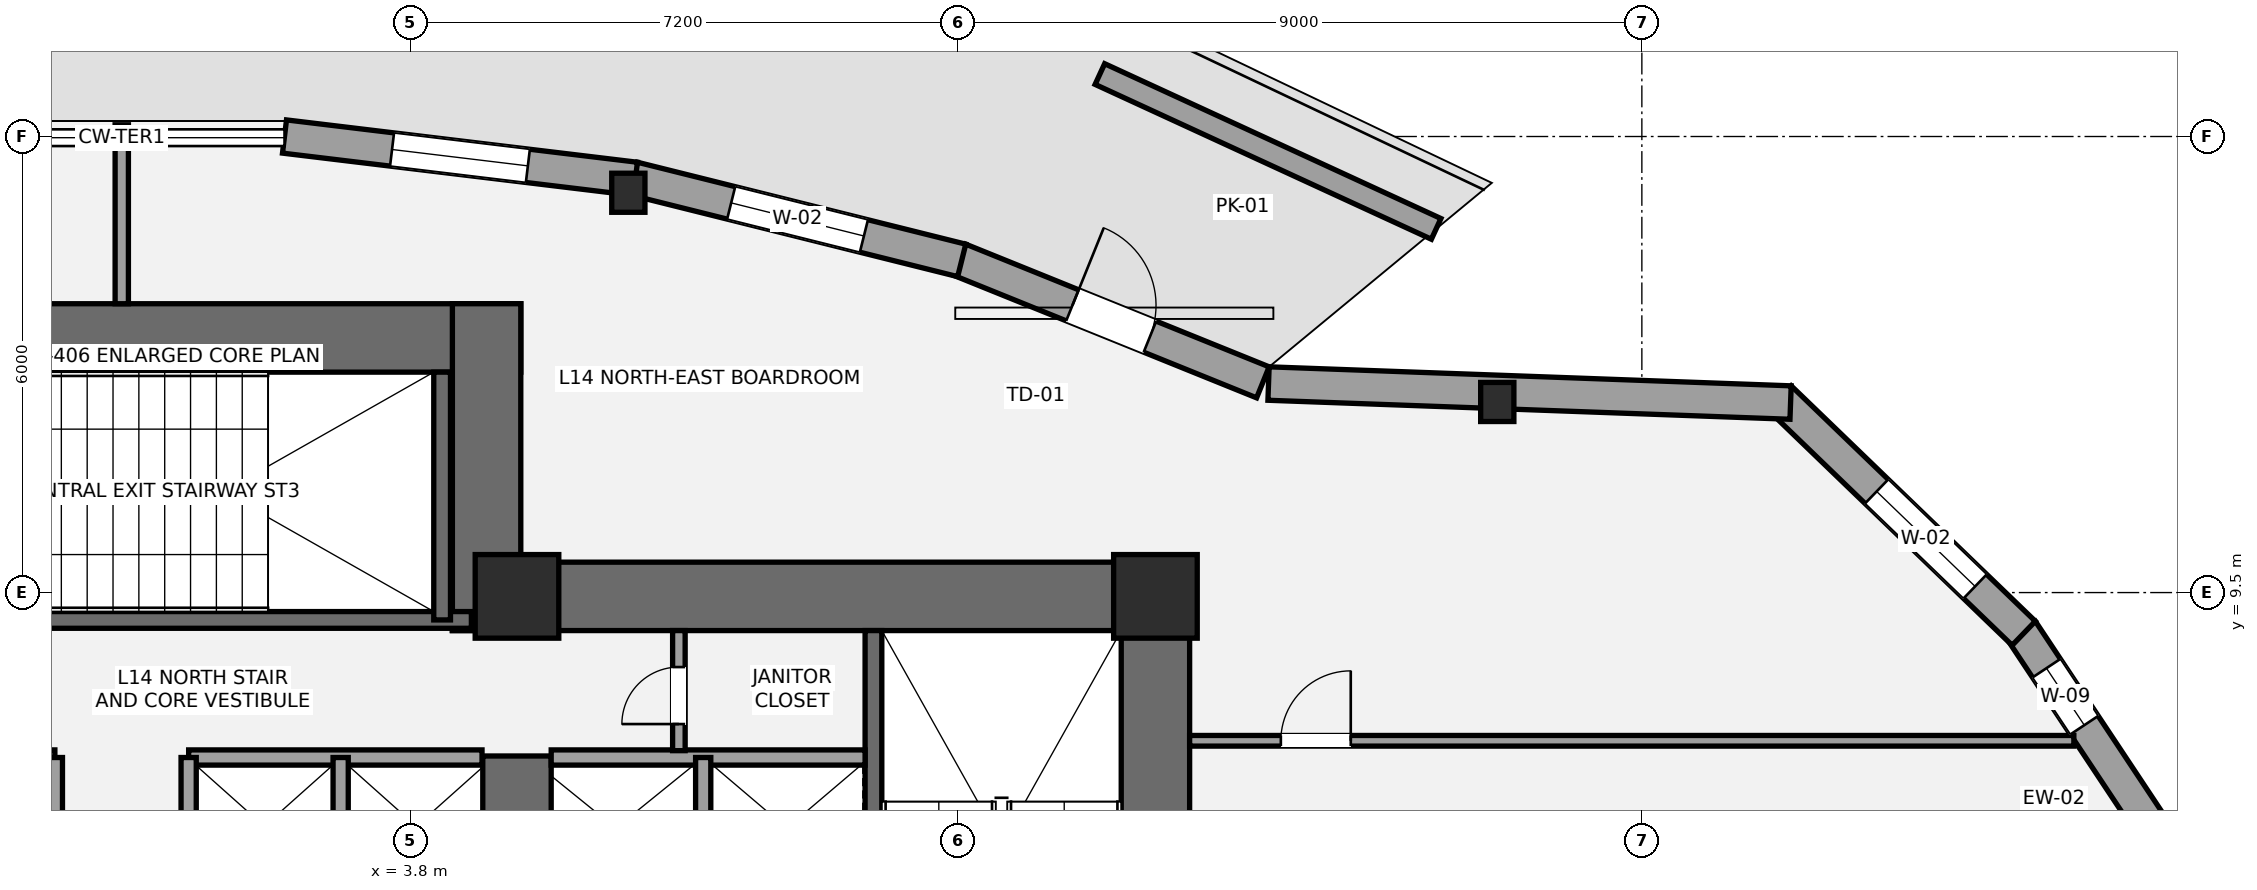
"""IFC4 building model, lengths in metres.
Left out: names, types, materials, properties, quantities, classifications, styles, units other than length and angle.
Written with IfcOpenShell. Run it as: python <this file> out.ifc"""

import sys

from ifc_helpers import new_model, si_unit, direction, frame, frame_2d, origin, origin_2d, place, context, subcontext, project, spatial, rectangle, i_section, extrude, element, fill, save


model = new_model("IFC4")
c1 = context("Model", 3, precision=1e-05, world=origin(), true_north=direction((0.0, 1.0)))
c2 = subcontext(c1, "Body", "Model", "MODEL_VIEW")
j1 = project(units=[si_unit("LENGTHUNIT", "METRE"), si_unit("PLANEANGLEUNIT", "RADIAN")], contexts=[c1])
p1 = place(None, origin())
s1 = spatial("IfcSite", under=j1, at=p1, CompositionType="ELEMENT")
p2 = place(p1, origin())
s2 = spatial("IfcBuilding", under=s1, at=p2, CompositionType="ELEMENT")
p3 = place(p2, frame((0.0, 0.0, 55.8)))
s3 = spatial("IfcBuildingStorey", under=s2, at=p3, CompositionType="ELEMENT", Elevation=55.8)
p4 = place(p3, frame((13.6, 0.95, 0.0), z_axis=(0.0, 0.0, 1.0), x_axis=(0.0, 1.0, 0.0)))
e1 = element("IfcWall", 1, at=p4, inside=s3, PredefinedType="SHEAR", context=c2, shape_type="SweptSolid", body=[
    extrude(rectangle(XDim=8.95, YDim=0.9, at=frame_2d((4.475, 0.0))), origin(), (0.0, 0.0, 1.0), 3.6),
])
p5 = place(p3, frame((4.35, 9.45, 0.0), z_axis=(0.0, 0.0, 1.0), x_axis=(1.0, 0.0, 0.0)))
e2 = element("IfcWall", 2, at=p5, inside=s3, PredefinedType="SHEAR", context=c2, shape_type="SweptSolid", body=[
    extrude(rectangle(XDim=9.7, YDim=0.9, at=frame_2d((4.85, 0.0))), origin(), (0.0, 0.0, 1.0), 3.6),
])
p6 = place(p3, frame((5.2, 5.35, 0.0), z_axis=(0.0, 0.0, 1.0), x_axis=(0.0, 1.0, 0.0)))
e3 = element("IfcWall", 3, at=p6, inside=s3, PredefinedType="SHEAR", context=c2, shape_type="SweptSolid", body=[
    extrude(rectangle(XDim=2.0, YDim=0.9, at=frame_2d((1.0, 0.0))), origin(), (0.0, 0.0, 1.0), 3.6),
])
p7 = place(p3, frame((9.89, 1.85, 0.0), z_axis=(0.0, 0.0, 1.0), x_axis=(0.0, 1.0, 0.0)))
e4 = element("IfcWall", 4, at=p7, inside=s3, PredefinedType="SHEAR", context=c2, shape_type="SweptSolid", body=[
    extrude(rectangle(XDim=7.15, YDim=0.22, at=frame_2d((3.575, 0.0))), origin(), (0.0, 0.0, 1.0), 3.6),
])
p8 = place(p3, frame((-5.25, 12.85, 0.0), z_axis=(0.0, 0.0, 1.0), x_axis=(1.0, 0.0, 0.0)))
e5 = element("IfcWall", 5, at=p8, inside=s3, PredefinedType="SHEAR", context=c2, shape_type="SweptSolid", body=[
    extrude(rectangle(XDim=10.5, YDim=0.9, at=frame_2d((5.25, 0.0))), origin(), (0.0, 0.0, 1.0), 3.6),
])
p9 = place(p3, frame((4.8, 9.0, 0.0), z_axis=(0.0, 0.0, 1.0), x_axis=(0.0, 1.0, 0.0)))
e6 = element("IfcWall", 6, at=p9, inside=s3, PredefinedType="SHEAR", context=c2, shape_type="SweptSolid", body=[
    extrude(rectangle(XDim=4.3, YDim=0.9, at=frame_2d((2.15, 0.0))), origin(), (0.0, 0.0, 1.0), 3.6),
])
p10 = place(p3, frame((-4.7, 9.14, 0.0), z_axis=(0.0, 0.0, 1.0), x_axis=(1.0, 0.0, 0.0)))
e7 = element("IfcWall", 7, at=p10, inside=s3, PredefinedType="SHEAR", context=c2, shape_type="SweptSolid", body=[
    extrude(rectangle(XDim=9.3, YDim=0.22, at=frame_2d((4.65, 0.0))), origin(), (0.0, 0.0, 1.0), 3.6),
])
p11 = place(p10, frame((1.15, 0.0, 0.0)))
e8 = element("IfcOpeningElement", 8, at=p11, cuts=e7, PredefinedType="OPENING", context=c2, shape_type="SweptSolid", body=[
    extrude(rectangle(XDim=1.05, YDim=2.15, at=frame_2d((0.525, 1.075))), frame((0.0, 0.12, 0.0), z_axis=(0.0, -1.0, 0.0), x_axis=(1.0, 0.0, 0.0)), (0.0, 0.0, 1.0), 0.24),
])
p12 = place(p3, frame((4.215, 9.14, 0.0), z_axis=(0.0, 0.0, 1.0), x_axis=(0.0, 1.0, 0.0)))
e9 = element("IfcWall", 9, at=p12, inside=s3, PredefinedType="SHEAR", context=c2, shape_type="SweptSolid", body=[
    extrude(rectangle(XDim=3.26, YDim=0.22, at=frame_2d((1.63, 0.0))), origin(), (0.0, 0.0, 1.0), 3.6),
])
for number, where, z_axis, x_axis in (
    (10, (5.2, 9.45, 0.0), (0.0, 0.0, 1.0), (1.0, 0.0, 0.0)),
    (11, (13.6, 9.45, 0.0), (0.0, 0.0, 1.0), (1.0, 0.0, 0.0)),
):
    element("IfcColumn", number, at=place(p3, frame(where, z_axis=z_axis, x_axis=x_axis)), inside=s3, PredefinedType="COLUMN", context=c2, shape_type="SweptSolid", body=[
        extrude(rectangle(XDim=1.1, YDim=1.1, at=origin_2d()), origin(), (0.0, 0.0, 1.0), 3.6),
    ])
for number, where, z_axis, x_axis in (
    (12, (18.098, 12.007, 0.0), (0.0, 0.0, 1.0), (1.0, 0.0, 0.0)),
    (13, (6.665, 14.76, 0.0), (0.0, 0.0, 1.0), (1.0, 0.0, 0.0)),
):
    element("IfcColumn", number, at=place(p3, frame(where, z_axis=z_axis, x_axis=x_axis)), inside=s3, PredefinedType="COLUMN", context=c2, shape_type="SweptSolid", body=[
        extrude(i_section(OverallWidth=0.437, OverallDepth=0.514, WebThickness=0.061, FlangeThickness=0.097, at=origin_2d()), origin(), (0.0, 0.0, 1.0), 3.6),
    ])
p13 = place(p3, frame((24.994, 9.001, 0.0), z_axis=(0.0, 0.0, 1.0), x_axis=(0.553144350008, -0.833085426625, 0.0)))
e14 = element("IfcWall", 14, at=p13, inside=s3, PredefinedType="STANDARD", context=c2, shape_type="SweptSolid", body=[
    extrude(rectangle(XDim=4.167, YDim=0.44, at=frame_2d((2.083, 0.0))), origin(), (0.0, 0.0, 1.0), 2.529),
])
p14 = place(p13, frame((0.595, 0.0, 0.58)))
e15 = element("IfcOpeningElement", 15, at=p14, cuts=e14, PredefinedType="OPENING", context=c2, shape_type="SweptSolid", body=[
    extrude(rectangle(XDim=0.9, YDim=1.35, at=frame_2d((0.45, 0.675))), frame((0.0, 0.23, 0.0), z_axis=(0.0, -1.0, 0.0), x_axis=(1.0, 0.0, 0.0)), (0.0, 0.0, 1.0), 0.46),
])
p15 = place(p3, frame((21.812, 12.061, 0.0), z_axis=(0.0, 0.0, 1.0), x_axis=(0.719928259859, -0.694048485811, 0.0)))
e16 = element("IfcWall", 16, at=p15, inside=s3, PredefinedType="STANDARD", context=c2, shape_type="SweptSolid", body=[
    extrude(rectangle(XDim=4.462, YDim=0.44, at=frame_2d((2.231, 0.0))), origin(), (0.0, 0.0, 1.0), 2.529),
])
p16 = place(p15, frame((1.774, 0.0, 0.65)))
e17 = element("IfcOpeningElement", 17, at=p16, cuts=e16, PredefinedType="OPENING", context=c2, shape_type="SweptSolid", body=[
    extrude(rectangle(XDim=1.8, YDim=1.7, at=frame_2d((0.9, 0.85))), frame((0.0, 0.23, 0.0), z_axis=(0.0, -1.0, 0.0), x_axis=(1.0, 0.0, 0.0)), (0.0, 0.0, 1.0), 0.46),
])
p17 = place(p3, frame((15.088, 12.25, 0.0), z_axis=(0.0, 0.0, 1.0), x_axis=(0.99933827779, -0.036373156908, 0.0)))
e18 = element("IfcWall", 18, at=p17, inside=s3, PredefinedType="STANDARD", context=c2, shape_type="SweptSolid", body=[
    extrude(rectangle(XDim=6.873, YDim=0.44, at=frame_2d((3.437, 0.0))), origin(), (0.0, 0.0, 1.0), 2.533),
])
p18 = place(p3, frame((11.022, 13.88, 0.0), z_axis=(0.0, 0.0, 1.0), x_axis=(0.927093714831, -0.374829619856, 0.0)))
e19 = element("IfcWall", 19, at=p18, inside=s3, PredefinedType="STANDARD", context=c2, shape_type="SweptSolid", body=[
    extrude(rectangle(XDim=4.305, YDim=0.44, at=frame_2d((2.153, 0.0))), origin(), (0.0, 0.0, 1.0), 2.533),
])
p19 = place(p18, frame((1.603, 0.0, 0.0)))
e20 = element("IfcOpeningElement", 20, at=p19, cuts=e19, PredefinedType="OPENING", context=c2, shape_type="SweptSolid", body=[
    extrude(rectangle(XDim=1.1, YDim=2.15, at=frame_2d((0.55, 1.075))), frame((0.0, 0.23, 0.0), z_axis=(0.0, -1.0, 0.0), x_axis=(1.0, 0.0, 0.0)), (0.0, 0.0, 1.0), 0.46),
])
p20 = place(p3, frame((6.731, 14.948, 0.0), z_axis=(0.0, 0.0, 1.0), x_axis=(0.970258497986, -0.242071161201, 0.0)))
e21 = element("IfcWall", 21, at=p20, inside=s3, PredefinedType="STANDARD", context=c2, shape_type="SweptSolid", body=[
    extrude(rectangle(XDim=4.453, YDim=0.44, at=frame_2d((2.226, 0.0))), origin(), (0.0, 0.0, 1.0), 2.533),
])
p21 = place(p20, frame((1.326, 0.0, 0.65)))
e22 = element("IfcOpeningElement", 22, at=p21, cuts=e21, PredefinedType="OPENING", context=c2, shape_type="SweptSolid", body=[
    extrude(rectangle(XDim=1.8, YDim=1.7, at=frame_2d((0.9, 0.85))), frame((0.0, 0.23, 0.0), z_axis=(0.0, -1.0, 0.0), x_axis=(1.0, 0.0, 0.0)), (0.0, 0.0, 1.0), 0.46),
])
p22 = place(p3, frame((2.141, 15.5, 0.0), z_axis=(0.0, 0.0, 1.0), x_axis=(0.992811109043, -0.119691694618, 0.0)))
e23 = element("IfcWall", 23, at=p22, inside=s3, PredefinedType="STANDARD", context=c2, shape_type="SweptSolid", body=[
    extrude(rectangle(XDim=4.651, YDim=0.44, at=frame_2d((2.325, 0.0))), origin(), (0.0, 0.0, 1.0), 2.533),
])
p23 = place(p22, frame((1.425, 0.0, 0.65)))
e24 = element("IfcOpeningElement", 24, at=p23, cuts=e23, PredefinedType="OPENING", context=c2, shape_type="SweptSolid", body=[
    extrude(rectangle(XDim=1.8, YDim=1.7, at=frame_2d((0.9, 0.85))), frame((0.0, 0.23, 0.0), z_axis=(0.0, -1.0, 0.0), x_axis=(1.0, 0.0, 0.0)), (0.0, 0.0, 1.0), 0.46),
])
p24 = place(p3, frame((17.293, 14.285, 0.0), z_axis=(0.0, 0.0, 1.0), x_axis=(-0.908369753419, 0.418167898186, 0.0)))
e25 = element("IfcWall", 25, at=p24, inside=s3, PredefinedType="PARAPET", context=c2, shape_type="SweptSolid", body=[
    extrude(rectangle(XDim=4.87, YDim=0.3, at=frame_2d((2.435, 0.0))), origin(), (0.0, 0.0, 1.0), 0.45),
])
p25 = place(p3, frame((5.65, 7.33, 0.0), z_axis=(0.0, 0.0, 1.0), x_axis=(1.0, 0.0, 0.0)))
e26 = element("IfcWall", 26, at=p25, inside=s3, PredefinedType="SOLIDWALL", context=c2, shape_type="SweptSolid", body=[
    extrude(rectangle(XDim=4.13, YDim=0.2, at=frame_2d((2.065, 0.0))), origin(), (0.0, 0.0, 1.0), 3.4),
])
p26 = place(p3, frame((7.65, 5.47, 0.0), z_axis=(0.0, 0.0, 1.0), x_axis=(0.0, 1.0, 0.0)))
e27 = element("IfcWall", 27, at=p26, inside=s3, PredefinedType="SOLIDWALL", context=c2, shape_type="SweptSolid", body=[
    extrude(rectangle(XDim=1.86, YDim=0.2, at=frame_2d((0.93, 0.0))), origin(), (0.0, 0.0, 1.0), 3.4),
])
for number, where, z_axis, x_axis in (
    (28, (-4.74, 7.33, 0.0), (0.0, 0.0, 1.0), (1.0, 0.0, 0.0)),
    (29, (0.88, 7.33, 0.0), (0.0, 0.0, 1.0), (1.0, 0.0, 0.0)),
):
    element("IfcWall", number, at=place(p3, frame(where, z_axis=z_axis, x_axis=x_axis)), inside=s3, PredefinedType="SOLIDWALL", context=c2, shape_type="SweptSolid", body=[
        extrude(rectangle(XDim=3.86, YDim=0.2, at=frame_2d((1.93, 0.0))), origin(), (0.0, 0.0, 1.0), 3.4),
    ])
for number, where, z_axis, x_axis in (
    (30, (2.88, 5.52, 0.0), (0.0, 0.0, 1.0), (0.0, 1.0, 0.0)),
    (31, (-0.88, 5.52, 0.0), (0.0, 0.0, 1.0), (0.0, 1.0, 0.0)),
    (32, (0.88, 5.52, 0.0), (0.0, 0.0, 1.0), (0.0, 1.0, 0.0)),
):
    element("IfcWall", number, at=place(p3, frame(where, z_axis=z_axis, x_axis=x_axis)), inside=s3, PredefinedType="SOLIDWALL", context=c2, shape_type="SweptSolid", body=[
        extrude(rectangle(XDim=1.81, YDim=0.2, at=frame_2d((0.905, 0.0))), origin(), (0.0, 0.0, 1.0), 3.4),
    ])
p27 = place(p3, frame((7.33, 7.42, 0.0), z_axis=(0.0, 0.0, 1.0), x_axis=(0.0, 1.0, 0.0)))
e33 = element("IfcWall", 33, at=p27, inside=s3, PredefinedType="PARTITIONING", context=c2, shape_type="SweptSolid", body=[
    extrude(rectangle(XDim=1.58, YDim=0.165, at=frame_2d((0.79, 0.0))), origin(), (0.0, 0.0, 1.0), 3.4),
])
p28 = place(p27, frame((0.35, 0.0, 0.0)))
e34 = element("IfcOpeningElement", 34, at=p28, cuts=e33, PredefinedType="OPENING", context=c2, shape_type="SweptSolid", body=[
    extrude(rectangle(XDim=0.75, YDim=2.1, at=frame_2d((0.375, 1.05))), frame((0.0, 0.093, 0.0), z_axis=(0.0, -1.0, 0.0), x_axis=(1.0, 0.0, 0.0)), (0.0, 0.0, 1.0), 0.185),
])
p29 = place(p3, frame((14.05, 7.55, 0.0), z_axis=(0.0, 0.0, 1.0), x_axis=(1.0, 0.0, 0.0)))
e35 = element("IfcWall", 35, at=p29, inside=s3, PredefinedType="PARTITIONING", context=c2, shape_type="SweptSolid", body=[
    extrude(rectangle(XDim=11.634, YDim=0.14, at=frame_2d((5.817, 0.0))), origin(), (0.0, 0.0, 1.0), 2.853),
])
p30 = place(p29, frame((1.2, 0.0, 0.0)))
e36 = element("IfcOpeningElement", 36, at=p30, cuts=e35, PredefinedType="OPENING", context=c2, shape_type="SweptSolid", body=[
    extrude(rectangle(XDim=0.92, YDim=2.15, at=frame_2d((0.46, 1.075))), frame((0.0, 0.08, 0.0), z_axis=(0.0, -1.0, 0.0), x_axis=(1.0, 0.0, 0.0)), (0.0, 0.0, 1.0), 0.16),
])
p31 = place(p3, frame((0.0, 13.3, 0.0), z_axis=(0.0, 0.0, 1.0), x_axis=(0.0, 1.0, 0.0)))
e37 = element("IfcWall", 37, at=p31, inside=s3, PredefinedType="PARTITIONING", context=c2, shape_type="SweptSolid", body=[
    extrude(rectangle(XDim=2.354, YDim=0.175, at=frame_2d((1.177, 0.0))), origin(), (0.0, 0.0, 1.0), 3.4),
])
p32 = place(p14, origin())
e38 = element("IfcWindow", 38, at=p32, inside=s3, PartitioningType="SINGLE_PANEL", PredefinedType="WINDOW", context=c2, shape_type="SweptSolid", body=[
    extrude(rectangle(XDim=0.9, YDim=1.35, at=frame_2d((0.45, 0.675))), frame((0.0, -0.01, 0.0), z_axis=(0.0, -1.0, 0.0), x_axis=(1.0, 0.0, 0.0)), (0.0, 0.0, 1.0), 0.06),
])
fill(e15, e38)
p33 = place(p16, origin())
e39 = element("IfcWindow", 39, at=p33, inside=s3, PartitioningType="SINGLE_PANEL", PredefinedType="WINDOW", context=c2, shape_type="SweptSolid", body=[
    extrude(rectangle(XDim=1.8, YDim=1.7, at=frame_2d((0.9, 0.85))), frame((0.0, -0.01, 0.0), z_axis=(0.0, -1.0, 0.0), x_axis=(1.0, 0.0, 0.0)), (0.0, 0.0, 1.0), 0.06),
])
fill(e17, e39)
p34 = place(p19, origin())
e40 = element("IfcDoor", 40, at=p34, inside=s3, OperationType="SINGLE_SWING_LEFT", PredefinedType="DOOR", context=c2, shape_type="SweptSolid", body=[
    extrude(rectangle(XDim=1.1, YDim=2.15, at=frame_2d((0.55, 1.075))), frame((0.0, 0.025, 0.0), z_axis=(0.0, -1.0, 0.0), x_axis=(1.0, 0.0, 0.0)), (0.0, 0.0, 1.0), 0.05),
])
fill(e20, e40)
p35 = place(p21, origin())
e41 = element("IfcWindow", 41, at=p35, inside=s3, PartitioningType="SINGLE_PANEL", PredefinedType="WINDOW", context=c2, shape_type="SweptSolid", body=[
    extrude(rectangle(XDim=1.8, YDim=1.7, at=frame_2d((0.9, 0.85))), frame((0.0, -0.01, 0.0), z_axis=(0.0, -1.0, 0.0), x_axis=(1.0, 0.0, 0.0)), (0.0, 0.0, 1.0), 0.06),
])
fill(e22, e41)
p36 = place(p23, origin())
e42 = element("IfcWindow", 42, at=p36, inside=s3, PartitioningType="SINGLE_PANEL", PredefinedType="WINDOW", context=c2, shape_type="SweptSolid", body=[
    extrude(rectangle(XDim=1.8, YDim=1.7, at=frame_2d((0.9, 0.85))), frame((0.0, -0.01, 0.0), z_axis=(0.0, -1.0, 0.0), x_axis=(1.0, 0.0, 0.0)), (0.0, 0.0, 1.0), 0.06),
])
fill(e24, e42)
p37 = place(p28, origin())
e43 = element("IfcDoor", 43, at=p37, inside=s3, OperationType="SINGLE_SWING_LEFT", PredefinedType="DOOR", context=c2, shape_type="SweptSolid", body=[
    extrude(rectangle(XDim=0.75, YDim=2.1, at=frame_2d((0.375, 1.05))), frame((0.0, 0.025, 0.0), z_axis=(0.0, -1.0, 0.0), x_axis=(1.0, 0.0, 0.0)), (0.0, 0.0, 1.0), 0.05),
])
fill(e34, e43)
p38 = place(p30, origin())
e44 = element("IfcDoor", 44, at=p38, inside=s3, OperationType="SINGLE_SWING_RIGHT", PredefinedType="DOOR", context=c2, shape_type="SweptSolid", body=[
    extrude(rectangle(XDim=0.92, YDim=2.15, at=frame_2d((0.46, 1.075))), frame((0.0, 0.025, 0.0), z_axis=(0.0, -1.0, 0.0), x_axis=(1.0, 0.0, 0.0)), (0.0, 0.0, 1.0), 0.05),
])
fill(e36, e44)
save(model, sys.argv[1])
